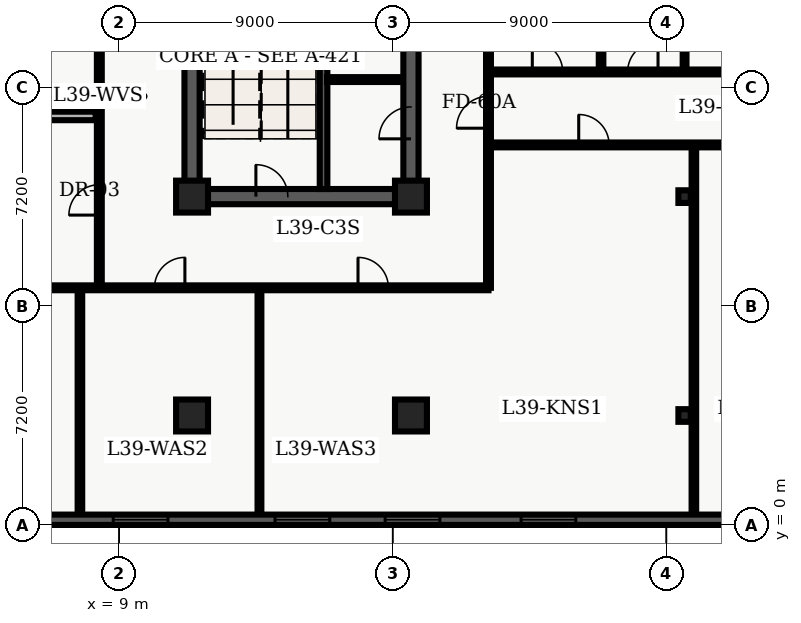
"""IFC4 building model, lengths in metres.
Left out: names, types, materials, properties, quantities, classifications, styles, units other than length and angle.
Written with IfcOpenShell. Run it as: python <this file> out.ifc"""

import sys

from ifc_helpers import new_model, entity, si_unit, converted_unit, direction, frame, origin_with_axes, origin_2d_with_axis, place, context, subcontext, project, spatial, polyline, rectangle, i_section, outline, extrude, element, fill, save


model = new_model("IFC4")
c1 = context("Model", 3, precision=1e-05, world=origin_with_axes(), true_north=direction((0.0, 1.0)))
c2 = subcontext(c1, "Body", "Model", "MODEL_VIEW")
j1 = project(units=[si_unit("LENGTHUNIT", "METRE"), converted_unit("PLANEANGLEUNIT", "DEGREE", entity("IfcPlaneAngleMeasure", 0.017), si_unit("PLANEANGLEUNIT", "RADIAN"), dimensions=[0, 0, 0, 0, 0, 0, 0])], contexts=[c1])
p1 = place(None, origin_with_axes())
s1 = spatial("IfcSite", under=j1, at=p1, CompositionType="ELEMENT")
p2 = place(p1, origin_with_axes())
s2 = spatial("IfcBuilding", under=s1, at=p2, CompositionType="ELEMENT")
p3 = place(p2, frame((0.0, 0.0, 160.2), z_axis=(0.0, 0.0, 1.0), x_axis=(1.0, 0.0, 0.0)))
s3 = spatial("IfcBuildingStorey", under=s2, at=p3, CompositionType="ELEMENT", Elevation=160.2)
p4 = place(p3, frame((11.4, 10.8, 0.0), z_axis=(0.0, 0.0, 1.0), x_axis=(0.0, 1.0, 0.0)))
e1 = element("IfcWall", 1, at=p4, inside=s3, PredefinedType="SHEAR", context=c2, shape_type="SweptSolid", body=[
    extrude(outline(polyline([(0.0, -0.25), (27.0, -0.25), (27.0, 0.25), (0.0, 0.25), (0.0, -0.25)])), origin_with_axes(), (0.0, 0.0, 1.0), 3.66),
])
p5 = place(p3, frame((11.4, 10.8, 0.0), z_axis=(0.0, 0.0, 1.0), x_axis=(1.0, 0.0, 0.0)))
e2 = element("IfcWall", 2, at=p5, inside=s3, PredefinedType="SHEAR", context=c2, shape_type="SweptSolid", body=[
    extrude(outline(polyline([(0.0, -0.25), (7.2, -0.25), (7.2, 0.25), (0.0, 0.25), (0.0, -0.25)])), origin_with_axes(), (0.0, 0.0, 1.0), 3.66),
])
p6 = place(p5, frame((2.625, 0.0, 0.0), z_axis=(0.0, 0.0, 1.0), x_axis=(1.0, 0.0, 0.0)))
e3 = element("IfcOpeningElement", 3, at=p6, cuts=e2, PredefinedType="OPENING", context=c2, shape_type="SweptSolid", body=[
    extrude(rectangle(XDim=1.05, YDim=0.52, at=origin_2d_with_axis()), origin_with_axes(), (0.0, 0.0, 1.0), 2.15),
])
p7 = place(p3, frame((18.6, 10.8, 0.0), z_axis=(0.0, 0.0, 1.0), x_axis=(0.0, 1.0, 0.0)))
e4 = element("IfcWall", 4, at=p7, inside=s3, PredefinedType="SHEAR", context=c2, shape_type="SweptSolid", body=[
    extrude(outline(polyline([(0.0, -0.25), (13.5, -0.25), (13.5, 0.25), (0.0, 0.25), (0.0, -0.25)])), origin_with_axes(), (0.0, 0.0, 1.0), 3.66),
])
p8 = place(p7, frame((11.125, 0.0, 0.0), z_axis=(0.0, 0.0, 1.0), x_axis=(1.0, 0.0, 0.0)))
e5 = element("IfcOpeningElement", 5, at=p8, cuts=e4, PredefinedType="OPENING", context=c2, shape_type="SweptSolid", body=[
    extrude(rectangle(XDim=1.05, YDim=0.52, at=origin_2d_with_axis()), origin_with_axes(), (0.0, 0.0, 1.0), 2.15),
])
p9 = place(p7, frame((2.425, 0.0, 0.0), z_axis=(0.0, 0.0, 1.0), x_axis=(1.0, 0.0, 0.0)))
e6 = element("IfcOpeningElement", 6, at=p9, cuts=e4, PredefinedType="OPENING", context=c2, shape_type="SweptSolid", body=[
    extrude(rectangle(XDim=1.05, YDim=0.52, at=origin_2d_with_axis()), origin_with_axes(), (0.0, 0.0, 1.0), 2.15),
])
p10 = place(p7, frame((6.625, 0.0, 0.0), z_axis=(0.0, 0.0, 1.0), x_axis=(1.0, 0.0, 0.0)))
e7 = element("IfcOpeningElement", 7, at=p10, cuts=e4, PredefinedType="OPENING", context=c2, shape_type="SweptSolid", body=[
    extrude(rectangle(XDim=1.05, YDim=0.52, at=origin_2d_with_axis()), origin_with_axes(), (0.0, 0.0, 1.0), 2.15),
])
p11 = place(p3, frame((15.725, 11.05, 0.0), z_axis=(0.0, 0.0, 1.0), x_axis=(0.0, 1.0, 0.0)))
e8 = element("IfcWall", 8, at=p11, inside=s3, PredefinedType="SHEAR", context=c2, shape_type="SweptSolid", body=[
    extrude(outline(polyline([(0.0, -0.125), (8.65, -0.125), (8.65, 0.125), (0.0, 0.125), (0.0, -0.125)])), origin_with_axes(), (0.0, 0.0, 1.0), 3.66),
])
for number, where, z_axis, x_axis in (
    (9, (11.4, 3.6, 0.0), (0.0, 0.0, 1.0), (1.0, 0.0, 0.0)),
    (10, (11.4, 10.8, 0.0), (0.0, 0.0, 1.0), (1.0, 0.0, 0.0)),
    (11, (18.6, 3.6, 0.0), (0.0, 0.0, 1.0), (1.0, 0.0, 0.0)),
    (12, (18.6, 10.8, 0.0), (0.0, 0.0, 1.0), (1.0, 0.0, 0.0)),
):
    element("IfcColumn", number, at=place(p3, frame(where, z_axis=z_axis, x_axis=x_axis)), inside=s3, PredefinedType="COLUMN", context=c2, shape_type="SweptSolid", body=[
        extrude(rectangle(XDim=1.05, YDim=1.05, at=origin_2d_with_axis()), origin_with_axes(), (0.0, 0.0, 1.0), 3.9),
    ])
for number, where, z_axis, x_axis in (
    (13, (27.6, 3.6, 0.0), (0.0, 0.0, 1.0), (1.0, 0.0, 0.0)),
    (14, (27.6, 10.8, 0.0), (0.0, 0.0, 1.0), (1.0, 0.0, 0.0)),
):
    element("IfcColumn", number, at=place(p3, frame(where, z_axis=z_axis, x_axis=x_axis)), inside=s3, PredefinedType="COLUMN", context=c2, shape_type="SweptSolid", body=[
        extrude(i_section(OverallWidth=0.406, OverallDepth=0.416, WebThickness=0.03, FlangeThickness=0.048, FilletRadius=0.022, at=origin_2d_with_axis()), origin_with_axes(), (0.0, 0.0, 1.0), 3.9),
    ])
p12 = place(p3, frame((15.84, 14.65, 0.0), z_axis=(0.0, 0.0, 1.0), x_axis=(1.0, 0.0, 0.0)))
e15 = element("IfcWall", 15, at=p12, inside=s3, PredefinedType="PARTITIONING", context=c2, shape_type="SweptSolid", body=[
    extrude(outline(polyline([(0.0, -0.08), (2.46, -0.08), (2.46, 0.08), (0.0, 0.08), (0.0, -0.08)])), origin_with_axes(), (0.0, 0.0, 1.0), 2.7),
])
p13 = place(p3, frame((2.6, 7.8, 0.0), z_axis=(0.0, 0.0, 1.0), x_axis=(1.0, 0.0, 0.0)))
e16 = element("IfcWall", 16, at=p13, inside=s3, PredefinedType="PARTITIONING", context=c2, shape_type="SweptSolid", body=[
    extrude(outline(polyline([(0.0, -0.08), (18.55, -0.08), (18.55, 0.08), (0.0, 0.08), (0.0, -0.08)])), origin_with_axes(), (0.0, 0.0, 1.0), 2.7),
])
p14 = place(p13, frame((2.551, 0.0, 0.0), z_axis=(0.0, 0.0, 1.0), x_axis=(1.0, 0.0, 0.0)))
e17 = element("IfcOpeningElement", 17, at=p14, cuts=e16, PredefinedType="OPENING", context=c2, shape_type="SweptSolid", body=[
    extrude(rectangle(XDim=1.0, YDim=0.18, at=origin_2d_with_axis()), origin_with_axes(), (0.0, 0.0, 1.0), 2.15),
])
p15 = place(p13, frame((8.065, 0.0, 0.0), z_axis=(0.0, 0.0, 1.0), x_axis=(1.0, 0.0, 0.0)))
e18 = element("IfcOpeningElement", 18, at=p15, cuts=e16, PredefinedType="OPENING", context=c2, shape_type="SweptSolid", body=[
    extrude(rectangle(XDim=1.0, YDim=0.18, at=origin_2d_with_axis()), origin_with_axes(), (0.0, 0.0, 1.0), 2.15),
])
p16 = place(p13, frame((14.758, 0.0, 0.0), z_axis=(0.0, 0.0, 1.0), x_axis=(1.0, 0.0, 0.0)))
e19 = element("IfcOpeningElement", 19, at=p16, cuts=e16, PredefinedType="OPENING", context=c2, shape_type="SweptSolid", body=[
    extrude(rectangle(XDim=1.0, YDim=0.18, at=origin_2d_with_axis()), origin_with_axes(), (0.0, 0.0, 1.0), 2.15),
])
p17 = place(p3, frame((21.15, 7.8, 0.0), z_axis=(0.0, 0.0, 1.0), x_axis=(0.0, 1.0, 0.0)))
e20 = element("IfcWall", 20, at=p17, inside=s3, PredefinedType="PARTITIONING", context=c2, shape_type="SweptSolid", body=[
    extrude(outline(polyline([(0.0, -0.08), (32.7, -0.08), (32.7, 0.08), (0.0, 0.08), (0.0, -0.08)])), origin_with_axes(), (0.0, 0.0, 1.0), 2.7),
])
p18 = place(p17, frame((5.775, 0.0, 0.0), z_axis=(0.0, 0.0, 1.0), x_axis=(1.0, 0.0, 0.0)))
e21 = element("IfcOpeningElement", 21, at=p18, cuts=e20, PredefinedType="OPENING", context=c2, shape_type="SweptSolid", body=[
    extrude(rectangle(XDim=1.05, YDim=0.18, at=origin_2d_with_axis()), origin_with_axes(), (0.0, 0.0, 1.0), 2.15),
])
p19 = place(p3, frame((8.35, 7.8, 0.0), z_axis=(0.0, 0.0, 1.0), x_axis=(0.0, 1.0, 0.0)))
e22 = element("IfcWall", 22, at=p19, inside=s3, PredefinedType="PARTITIONING", context=c2, shape_type="SweptSolid", body=[
    extrude(outline(polyline([(0.0, -0.08), (12.6, -0.08), (12.6, 0.08), (0.0, 0.08), (0.0, -0.08)])), origin_with_axes(), (0.0, 0.0, 1.0), 2.7),
])
p20 = place(p19, frame((2.892, 0.0, 0.0), z_axis=(0.0, 0.0, 1.0), x_axis=(1.0, 0.0, 0.0)))
e23 = element("IfcOpeningElement", 23, at=p20, cuts=e22, PredefinedType="OPENING", context=c2, shape_type="SweptSolid", body=[
    extrude(rectangle(XDim=1.0, YDim=0.18, at=origin_2d_with_axis()), origin_with_axes(), (0.0, 0.0, 1.0), 2.15),
])
p21 = place(p19, frame((9.087, 0.0, 0.0), z_axis=(0.0, 0.0, 1.0), x_axis=(1.0, 0.0, 0.0)))
e24 = element("IfcOpeningElement", 24, at=p21, cuts=e22, PredefinedType="OPENING", context=c2, shape_type="SweptSolid", body=[
    extrude(rectangle(XDim=1.0, YDim=0.18, at=origin_2d_with_axis()), origin_with_axes(), (0.0, 0.0, 1.0), 2.15),
])
p22 = place(p3, frame((0.335, 13.454, 0.0), z_axis=(0.0, 0.0, 1.0), x_axis=(1.0, 0.0, 0.0)))
e25 = element("IfcWall", 25, at=p22, inside=s3, PredefinedType="PARTITIONING", context=c2, shape_type="SweptSolid", body=[
    extrude(outline(polyline([(0.0, -0.14), (7.895, -0.14), (7.895, 0.14), (0.0, 0.14), (0.0, -0.14)])), origin_with_axes(), (0.0, 0.0, 1.0), 2.7),
])
p23 = place(p3, frame((7.712, 0.335, 0.0), z_axis=(0.0, 0.0, 1.0), x_axis=(0.0, 1.0, 0.0)))
e26 = element("IfcWall", 26, at=p23, inside=s3, PredefinedType="PARTITIONING", context=c2, shape_type="SweptSolid", body=[
    extrude(outline(polyline([(0.0, -0.075), (7.365, -0.075), (7.365, 0.075), (0.0, 0.075), (0.0, -0.075)])), origin_with_axes(), (0.0, 0.0, 1.0), 2.7),
])
p24 = place(p3, frame((13.617, 0.335, 0.0), z_axis=(0.0, 0.0, 1.0), x_axis=(0.0, 1.0, 0.0)))
e27 = element("IfcWall", 27, at=p24, inside=s3, PredefinedType="PARTITIONING", context=c2, shape_type="SweptSolid", body=[
    extrude(outline(polyline([(0.0, -0.062), (7.365, -0.062), (7.365, 0.062), (0.0, 0.062), (0.0, -0.062)])), origin_with_axes(), (0.0, 0.0, 1.0), 2.7),
])
p25 = place(p3, frame((21.15, 12.5, 0.0), z_axis=(0.0, 0.0, 1.0), x_axis=(1.0, 0.0, 0.0)))
e28 = element("IfcWall", 28, at=p25, inside=s3, PredefinedType="PARTITIONING", context=c2, shape_type="SweptSolid", body=[
    extrude(outline(polyline([(0.0, -0.08), (15.2, -0.08), (15.2, 0.08), (0.0, 0.08), (0.0, -0.08)])), origin_with_axes(), (0.0, 0.0, 1.0), 2.7),
])
p26 = place(p25, frame((3.468, 0.0, 0.0), z_axis=(0.0, 0.0, 1.0), x_axis=(1.0, 0.0, 0.0)))
e29 = element("IfcOpeningElement", 29, at=p26, cuts=e28, PredefinedType="OPENING", context=c2, shape_type="SweptSolid", body=[
    extrude(rectangle(XDim=1.0, YDim=0.18, at=origin_2d_with_axis()), origin_with_axes(), (0.0, 0.0, 1.0), 2.15),
])
p27 = place(p25, frame((10.938, 0.0, 0.0), z_axis=(0.0, 0.0, 1.0), x_axis=(1.0, 0.0, 0.0)))
e30 = element("IfcOpeningElement", 30, at=p27, cuts=e28, PredefinedType="OPENING", context=c2, shape_type="SweptSolid", body=[
    extrude(rectangle(XDim=1.2, YDim=0.18, at=origin_2d_with_axis()), origin_with_axes(), (0.0, 0.0, 1.0), 2.2),
])
p28 = place(p3, frame((21.15, 14.9, 0.0), z_axis=(0.0, 0.0, 1.0), x_axis=(1.0, 0.0, 0.0)))
e31 = element("IfcWall", 31, at=p28, inside=s3, PredefinedType="PARTITIONING", context=c2, shape_type="SweptSolid", body=[
    extrude(outline(polyline([(0.0, -0.08), (15.2, -0.08), (15.2, 0.08), (0.0, 0.08), (0.0, -0.08)])), origin_with_axes(), (0.0, 0.0, 1.0), 2.7),
])
p29 = place(p28, frame((1.942, 0.0, 0.0), z_axis=(0.0, 0.0, 1.0), x_axis=(1.0, 0.0, 0.0)))
e32 = element("IfcOpeningElement", 32, at=p29, cuts=e31, PredefinedType="OPENING", context=c2, shape_type="SweptSolid", body=[
    extrude(rectangle(XDim=1.0, YDim=0.18, at=origin_2d_with_axis()), origin_with_axes(), (0.0, 0.0, 1.0), 2.15),
])
p30 = place(p28, frame((5.077, 0.0, 0.0), z_axis=(0.0, 0.0, 1.0), x_axis=(1.0, 0.0, 0.0)))
e33 = element("IfcOpeningElement", 33, at=p30, cuts=e31, PredefinedType="OPENING", context=c2, shape_type="SweptSolid", body=[
    extrude(rectangle(XDim=1.0, YDim=0.18, at=origin_2d_with_axis()), origin_with_axes(), (0.0, 0.0, 1.0), 2.15),
])
p31 = place(p28, frame((9.281, 0.0, 0.0), z_axis=(0.0, 0.0, 1.0), x_axis=(1.0, 0.0, 0.0)))
e34 = element("IfcOpeningElement", 34, at=p31, cuts=e31, PredefinedType="OPENING", context=c2, shape_type="SweptSolid", body=[
    extrude(rectangle(XDim=1.0, YDim=0.18, at=origin_2d_with_axis()), origin_with_axes(), (0.0, 0.0, 1.0), 2.15),
])
p32 = place(p28, frame((13.617, 0.0, 0.0), z_axis=(0.0, 0.0, 1.0), x_axis=(1.0, 0.0, 0.0)))
e35 = element("IfcOpeningElement", 35, at=p32, cuts=e31, PredefinedType="OPENING", context=c2, shape_type="SweptSolid", body=[
    extrude(rectangle(XDim=1.0, YDim=0.18, at=origin_2d_with_axis()), origin_with_axes(), (0.0, 0.0, 1.0), 2.15),
])
p33 = place(p3, frame((27.906, 0.335, 0.0), z_axis=(0.0, 0.0, 1.0), x_axis=(0.0, 1.0, 0.0)))
e36 = element("IfcWall", 36, at=p33, inside=s3, PredefinedType="PARTITIONING", context=c2, shape_type="SweptSolid", body=[
    extrude(outline(polyline([(0.0, -0.075), (12.045, -0.075), (12.045, 0.075), (0.0, 0.075), (0.0, -0.075)])), origin_with_axes(), (0.0, 0.0, 1.0), 2.7),
])
p34 = place(p3, frame((24.853, 15.02, 0.0), z_axis=(0.0, 0.0, 1.0), x_axis=(0.0, 1.0, 0.0)))
e37 = element("IfcWall", 37, at=p34, inside=s3, PredefinedType="PARTITIONING", context=c2, shape_type="SweptSolid", body=[
    extrude(outline(polyline([(0.0, -0.075), (6.245, -0.075), (6.245, 0.075), (0.0, 0.075), (0.0, -0.075)])), origin_with_axes(), (0.0, 0.0, 1.0), 2.7),
])
p35 = place(p3, frame((27.6, 15.02, 0.0), z_axis=(0.0, 0.0, 1.0), x_axis=(0.0, 1.0, 0.0)))
e38 = element("IfcWall", 38, at=p35, inside=s3, PredefinedType="PARTITIONING", context=c2, shape_type="SweptSolid", body=[
    extrude(outline(polyline([(0.0, -0.062), (6.245, -0.062), (6.245, 0.062), (0.0, 0.062), (0.0, -0.062)])), origin_with_axes(), (0.0, 0.0, 1.0), 2.7),
])
p36 = place(p3, frame((57.26, 0.17, 0.0), z_axis=(0.0, 0.0, 1.0), x_axis=(-1.0, 0.0, 0.0)))
e39 = element("IfcWall", 39, at=p36, inside=s3, PredefinedType="SOLIDWALL", context=c2, shape_type="SweptSolid", body=[
    extrude(outline(polyline([(0.0, -0.17), (54.86, -0.17), (54.86, 0.17), (0.0, 0.17), (0.0, -0.17)])), origin_with_axes(), (0.0, 0.0, 1.0), 3.66),
])
p37 = place(p36, frame((2.836, 0.0, 0.45), z_axis=(0.0, 0.0, 1.0), x_axis=(1.0, 0.0, 0.0)))
e40 = element("IfcOpeningElement", 40, at=p37, cuts=e39, PredefinedType="OPENING", context=c2, shape_type="SweptSolid", body=[
    extrude(rectangle(XDim=1.8, YDim=0.36, at=origin_2d_with_axis()), origin_with_axes(), (0.0, 0.0, 1.0), 2.1),
])
p38 = place(p36, frame((7.307, 0.0, 0.45), z_axis=(0.0, 0.0, 1.0), x_axis=(1.0, 0.0, 0.0)))
e41 = element("IfcOpeningElement", 41, at=p38, cuts=e39, PredefinedType="OPENING", context=c2, shape_type="SweptSolid", body=[
    extrude(rectangle(XDim=1.8, YDim=0.36, at=origin_2d_with_axis()), origin_with_axes(), (0.0, 0.0, 1.0), 2.1),
])
p39 = place(p36, frame((11.779, 0.0, 0.45), z_axis=(0.0, 0.0, 1.0), x_axis=(1.0, 0.0, 0.0)))
e42 = element("IfcOpeningElement", 42, at=p39, cuts=e39, PredefinedType="OPENING", context=c2, shape_type="SweptSolid", body=[
    extrude(rectangle(XDim=1.8, YDim=0.36, at=origin_2d_with_axis()), origin_with_axes(), (0.0, 0.0, 1.0), 2.1),
])
p40 = place(p36, frame((16.251, 0.0, 0.45), z_axis=(0.0, 0.0, 1.0), x_axis=(1.0, 0.0, 0.0)))
e43 = element("IfcOpeningElement", 43, at=p40, cuts=e39, PredefinedType="OPENING", context=c2, shape_type="SweptSolid", body=[
    extrude(rectangle(XDim=1.8, YDim=0.36, at=origin_2d_with_axis()), origin_with_axes(), (0.0, 0.0, 1.0), 2.1),
])
p41 = place(p36, frame((20.723, 0.0, 0.45), z_axis=(0.0, 0.0, 1.0), x_axis=(1.0, 0.0, 0.0)))
e44 = element("IfcOpeningElement", 44, at=p41, cuts=e39, PredefinedType="OPENING", context=c2, shape_type="SweptSolid", body=[
    extrude(rectangle(XDim=1.8, YDim=0.36, at=origin_2d_with_axis()), origin_with_axes(), (0.0, 0.0, 1.0), 2.1),
])
p42 = place(p36, frame((25.194, 0.0, 0.45), z_axis=(0.0, 0.0, 1.0), x_axis=(1.0, 0.0, 0.0)))
e45 = element("IfcOpeningElement", 45, at=p42, cuts=e39, PredefinedType="OPENING", context=c2, shape_type="SweptSolid", body=[
    extrude(rectangle(XDim=1.8, YDim=0.36, at=origin_2d_with_axis()), origin_with_axes(), (0.0, 0.0, 1.0), 2.1),
])
p43 = place(p36, frame((34.138, 0.0, 0.45), z_axis=(0.0, 0.0, 1.0), x_axis=(1.0, 0.0, 0.0)))
e46 = element("IfcOpeningElement", 46, at=p43, cuts=e39, PredefinedType="OPENING", context=c2, shape_type="SweptSolid", body=[
    extrude(rectangle(XDim=1.8, YDim=0.36, at=origin_2d_with_axis()), origin_with_axes(), (0.0, 0.0, 1.0), 2.1),
])
p44 = place(p36, frame((38.609, 0.0, 0.45), z_axis=(0.0, 0.0, 1.0), x_axis=(1.0, 0.0, 0.0)))
e47 = element("IfcOpeningElement", 47, at=p44, cuts=e39, PredefinedType="OPENING", context=c2, shape_type="SweptSolid", body=[
    extrude(rectangle(XDim=1.8, YDim=0.36, at=origin_2d_with_axis()), origin_with_axes(), (0.0, 0.0, 1.0), 2.1),
])
p45 = place(p36, frame((42.231, 0.0, 0.45), z_axis=(0.0, 0.0, 1.0), x_axis=(1.0, 0.0, 0.0)))
e48 = element("IfcOpeningElement", 48, at=p45, cuts=e39, PredefinedType="OPENING", context=c2, shape_type="SweptSolid", body=[
    extrude(rectangle(XDim=1.8, YDim=0.36, at=origin_2d_with_axis()), origin_with_axes(), (0.0, 0.0, 1.0), 2.1),
])
p46 = place(p36, frame((47.553, 0.0, 0.45), z_axis=(0.0, 0.0, 1.0), x_axis=(1.0, 0.0, 0.0)))
e49 = element("IfcOpeningElement", 49, at=p46, cuts=e39, PredefinedType="OPENING", context=c2, shape_type="SweptSolid", body=[
    extrude(rectangle(XDim=1.8, YDim=0.36, at=origin_2d_with_axis()), origin_with_axes(), (0.0, 0.0, 1.0), 2.1),
])
p47 = place(p36, frame((52.024, 0.0, 0.45), z_axis=(0.0, 0.0, 1.0), x_axis=(1.0, 0.0, 0.0)))
e50 = element("IfcOpeningElement", 50, at=p47, cuts=e39, PredefinedType="OPENING", context=c2, shape_type="SweptSolid", body=[
    extrude(rectangle(XDim=1.8, YDim=0.36, at=origin_2d_with_axis()), origin_with_axes(), (0.0, 0.0, 1.0), 2.1),
])
p48 = place(p5, frame((2.625, 0.0, 0.0), z_axis=(0.0, 0.0, 1.0), x_axis=(1.0, 0.0, 0.0)))
e51 = element("IfcDoor", 51, at=p48, inside=s3, OperationType="SINGLE_SWING_LEFT", PredefinedType="DOOR", context=c2, shape_type="SweptSolid", body=[
    extrude(rectangle(XDim=1.05, YDim=0.09, at=origin_2d_with_axis()), origin_with_axes(), (0.0, 0.0, 1.0), 2.15),
])
fill(e3, e51)
p49 = place(p7, frame((2.425, 0.0, 0.0), z_axis=(0.0, 0.0, 1.0), x_axis=(1.0, 0.0, 0.0)))
e52 = element("IfcDoor", 52, at=p49, inside=s3, OperationType="SINGLE_SWING_LEFT", PredefinedType="DOOR", context=c2, shape_type="SweptSolid", body=[
    extrude(rectangle(XDim=1.05, YDim=0.09, at=origin_2d_with_axis()), origin_with_axes(), (0.0, 0.0, 1.0), 2.15),
])
fill(e6, e52)
p50 = place(p19, frame((2.892, 0.0, 0.0), z_axis=(0.0, 0.0, 1.0), x_axis=(1.0, 0.0, 0.0)))
e53 = element("IfcDoor", 53, at=p50, inside=s3, OperationType="SINGLE_SWING_LEFT", PredefinedType="DOOR", context=c2, shape_type="SweptSolid", body=[
    extrude(rectangle(XDim=1.0, YDim=0.09, at=origin_2d_with_axis()), origin_with_axes(), (0.0, 0.0, 1.0), 2.15),
])
fill(e23, e53)
p51 = place(p13, frame((8.065, 0.0, 0.0), z_axis=(0.0, 0.0, 1.0), x_axis=(1.0, 0.0, 0.0)))
e54 = element("IfcDoor", 54, at=p51, inside=s3, OperationType="SINGLE_SWING_RIGHT", PredefinedType="DOOR", context=c2, shape_type="SweptSolid", body=[
    extrude(rectangle(XDim=1.0, YDim=0.09, at=origin_2d_with_axis()), origin_with_axes(), (0.0, 0.0, 1.0), 2.15),
])
fill(e18, e54)
p52 = place(p13, frame((14.758, 0.0, 0.0), z_axis=(0.0, 0.0, 1.0), x_axis=(1.0, 0.0, 0.0)))
e55 = element("IfcDoor", 55, at=p52, inside=s3, OperationType="SINGLE_SWING_LEFT", PredefinedType="DOOR", context=c2, shape_type="SweptSolid", body=[
    extrude(rectangle(XDim=1.0, YDim=0.09, at=origin_2d_with_axis()), origin_with_axes(), (0.0, 0.0, 1.0), 2.15),
])
fill(e19, e55)
p53 = place(p17, frame((5.775, 0.0, 0.0), z_axis=(0.0, 0.0, 1.0), x_axis=(1.0, 0.0, 0.0)))
e56 = element("IfcDoor", 56, at=p53, inside=s3, OperationType="SINGLE_SWING_LEFT", PredefinedType="DOOR", context=c2, shape_type="SweptSolid", body=[
    extrude(rectangle(XDim=1.05, YDim=0.09, at=origin_2d_with_axis()), origin_with_axes(), (0.0, 0.0, 1.0), 2.15),
])
fill(e21, e56)
p54 = place(p25, frame((3.468, 0.0, 0.0), z_axis=(0.0, 0.0, 1.0), x_axis=(1.0, 0.0, 0.0)))
e57 = element("IfcDoor", 57, at=p54, inside=s3, OperationType="SINGLE_SWING_LEFT", PredefinedType="DOOR", context=c2, shape_type="SweptSolid", body=[
    extrude(rectangle(XDim=1.0, YDim=0.09, at=origin_2d_with_axis()), origin_with_axes(), (0.0, 0.0, 1.0), 2.15),
])
fill(e29, e57)
p55 = place(p28, frame((1.942, 0.0, 0.0), z_axis=(0.0, 0.0, 1.0), x_axis=(1.0, 0.0, 0.0)))
e58 = element("IfcDoor", 58, at=p55, inside=s3, OperationType="SINGLE_SWING_LEFT", PredefinedType="DOOR", context=c2, shape_type="SweptSolid", body=[
    extrude(rectangle(XDim=1.0, YDim=0.09, at=origin_2d_with_axis()), origin_with_axes(), (0.0, 0.0, 1.0), 2.15),
])
fill(e32, e58)
p56 = place(p28, frame((5.077, 0.0, 0.0), z_axis=(0.0, 0.0, 1.0), x_axis=(1.0, 0.0, 0.0)))
e59 = element("IfcDoor", 59, at=p56, inside=s3, OperationType="SINGLE_SWING_RIGHT", PredefinedType="DOOR", context=c2, shape_type="SweptSolid", body=[
    extrude(rectangle(XDim=1.0, YDim=0.09, at=origin_2d_with_axis()), origin_with_axes(), (0.0, 0.0, 1.0), 2.15),
])
fill(e33, e59)
p57 = place(p36, frame((34.138, 0.0, 0.45), z_axis=(0.0, 0.0, 1.0), x_axis=(1.0, 0.0, 0.0)))
e60 = element("IfcWindow", 60, at=p57, inside=s3, PredefinedType="WINDOW", context=c2, shape_type="SweptSolid", body=[
    extrude(rectangle(XDim=1.8, YDim=0.09, at=origin_2d_with_axis()), origin_with_axes(), (0.0, 0.0, 1.0), 2.1),
])
fill(e46, e60)
p58 = place(p36, frame((38.609, 0.0, 0.45), z_axis=(0.0, 0.0, 1.0), x_axis=(1.0, 0.0, 0.0)))
e61 = element("IfcWindow", 61, at=p58, inside=s3, PredefinedType="WINDOW", context=c2, shape_type="SweptSolid", body=[
    extrude(rectangle(XDim=1.8, YDim=0.09, at=origin_2d_with_axis()), origin_with_axes(), (0.0, 0.0, 1.0), 2.1),
])
fill(e47, e61)
p59 = place(p36, frame((42.231, 0.0, 0.45), z_axis=(0.0, 0.0, 1.0), x_axis=(1.0, 0.0, 0.0)))
e62 = element("IfcWindow", 62, at=p59, inside=s3, PredefinedType="WINDOW", context=c2, shape_type="SweptSolid", body=[
    extrude(rectangle(XDim=1.8, YDim=0.09, at=origin_2d_with_axis()), origin_with_axes(), (0.0, 0.0, 1.0), 2.1),
])
fill(e48, e62)
p60 = place(p36, frame((47.553, 0.0, 0.45), z_axis=(0.0, 0.0, 1.0), x_axis=(1.0, 0.0, 0.0)))
e63 = element("IfcWindow", 63, at=p60, inside=s3, PredefinedType="WINDOW", context=c2, shape_type="SweptSolid", body=[
    extrude(rectangle(XDim=1.8, YDim=0.09, at=origin_2d_with_axis()), origin_with_axes(), (0.0, 0.0, 1.0), 2.1),
])
fill(e49, e63)
save(model, sys.argv[1])
